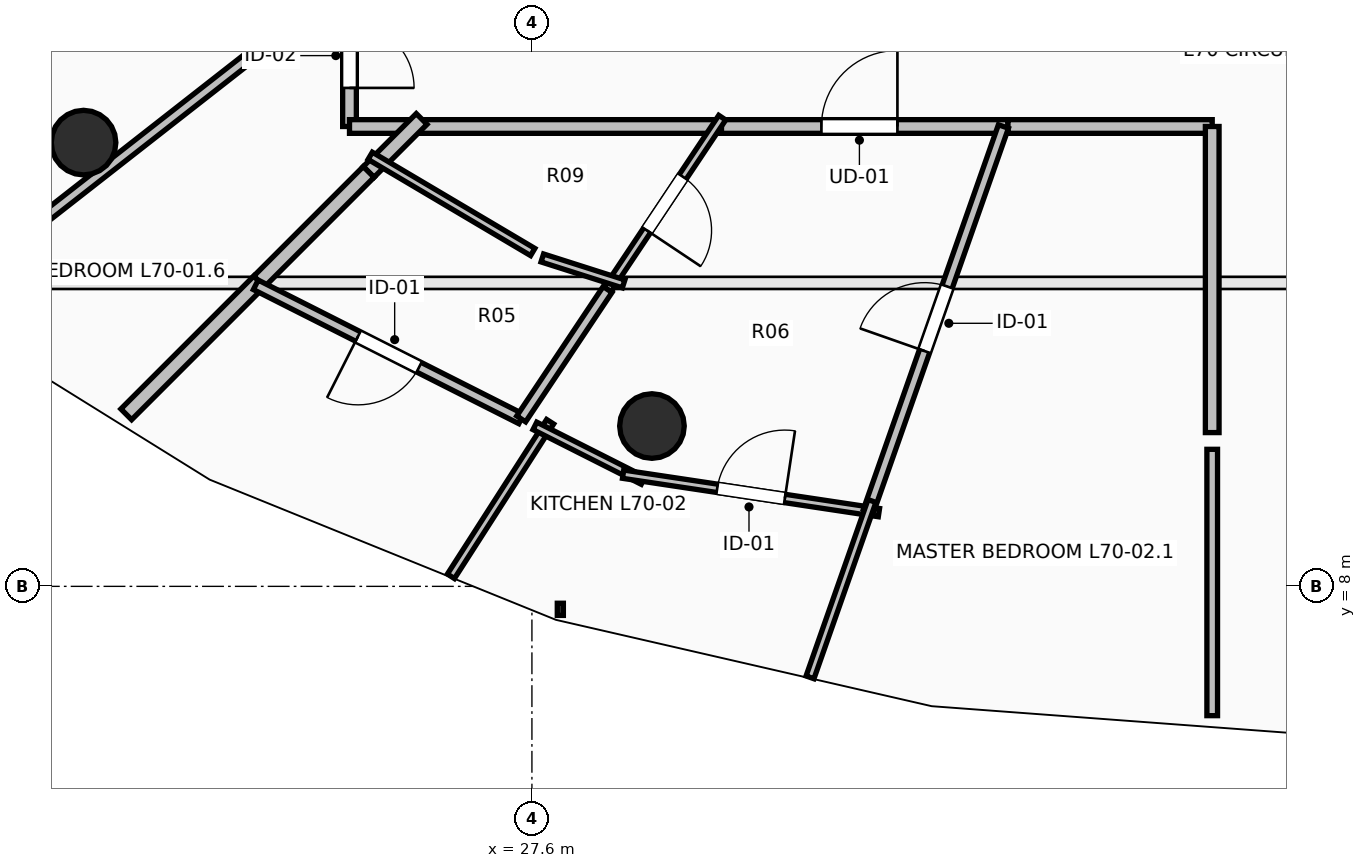
"""IFC4 building model, lengths in metres.
Left out: names, types, materials, properties, quantities, classifications, styles, units other than length and angle.
Written with IfcOpenShell. Run it as: python <this file> out.ifc"""

import sys

from ifc_helpers import new_model, si_unit, direction, frame, frame_2d, origin, origin_2d, place, context, subcontext, project, spatial, rectangle, circle, extrude, element, fill, save


model = new_model("IFC4")
c1 = context("Model", 3, precision=1e-05, world=origin(), true_north=direction((0.0, 1.0)))
c2 = subcontext(c1, "Body", "Model", "MODEL_VIEW")
j1 = project(units=[si_unit("LENGTHUNIT", "METRE"), si_unit("PLANEANGLEUNIT", "RADIAN")], contexts=[c1])
p1 = place(None, origin())
s1 = spatial("IfcSite", under=j1, at=p1, CompositionType="ELEMENT")
p2 = place(p1, origin())
s2 = spatial("IfcBuilding", under=s1, at=p2, CompositionType="ELEMENT")
p3 = place(p2, frame((0.0, 0.0, 259.1)))
s3 = spatial("IfcBuildingStorey", under=s2, at=p3, CompositionType="ELEMENT", Elevation=259.1)
for number, where, z_axis, x_axis in (
    (1, (21.701, 13.838, 0.0), (0.0, 0.0, 1.0), (-0.707, -0.707, 0.0)),
    (2, (29.179, 10.109, 0.0), (0.0, 0.0, 1.0), (-0.383, -0.924, 0.0)),
):
    element("IfcColumn", number, at=place(p3, frame(where, z_axis=z_axis, x_axis=x_axis)), inside=s3, PredefinedType="COLUMN", context=c2, shape_type="SweptSolid", body=[
        extrude(circle(Radius=0.425, at=origin_2d()), origin(), (0.0, 0.0, 1.0), 3.55),
    ])
p4 = place(p3, frame((25.2, 15.915, 0.0), z_axis=(0.0, 0.0, 1.0), x_axis=(0.0, -1.0, 0.0)))
e3 = element("IfcWall", 3, at=p4, inside=s3, PredefinedType="PARTITIONING", context=c2, shape_type="SweptSolid", body=[
    extrude(rectangle(XDim=1.865, YDim=0.18, at=frame_2d((0.933, 0.0))), origin(), (0.0, 0.0, 1.0), 2.482),
])
p5 = place(p4, frame((0.508, 0.0, 0.0)))
e4 = element("IfcOpeningElement", 4, at=p5, cuts=e3, PredefinedType="OPENING", context=c2, shape_type="SweptSolid", body=[
    extrude(rectangle(XDim=0.85, YDim=2.1, at=frame_2d((0.425, 1.05))), frame((0.0, 0.105, 0.0), z_axis=(0.0, -1.0, 0.0), x_axis=(1.0, 0.0, 0.0)), (0.0, 0.0, 1.0), 0.21),
])
p6 = place(p3, frame((25.2, 14.05, 0.0), z_axis=(0.0, 0.0, 1.0), x_axis=(1.0, 0.0, 0.0)))
e5 = element("IfcWall", 5, at=p6, inside=s3, PredefinedType="PARTITIONING", context=c2, shape_type="SweptSolid", body=[
    extrude(rectangle(XDim=0.91, YDim=0.18, at=frame_2d((0.455, 0.0))), origin(), (0.0, 0.0, 1.0), 3.022),
])
p7 = place(p3, frame((29.954, 14.05, 0.0), z_axis=(0.0, 0.0, 1.0), x_axis=(1.0, 0.0, 0.0)))
e6 = element("IfcWall", 6, at=p7, inside=s3, PredefinedType="PARTITIONING", context=c2, shape_type="SweptSolid", body=[
    extrude(rectangle(XDim=3.909, YDim=0.18, at=frame_2d((1.955, 0.0))), origin(), (0.0, 0.0, 1.0), 2.936),
])
p8 = place(p7, frame((1.455, 0.0, 0.0)))
e7 = element("IfcOpeningElement", 7, at=p8, cuts=e6, PredefinedType="OPENING", context=c2, shape_type="SweptSolid", body=[
    extrude(rectangle(XDim=1.0, YDim=2.15, at=frame_2d((0.5, 1.075))), frame((0.0, 0.105, 0.0), z_axis=(0.0, -1.0, 0.0), x_axis=(1.0, 0.0, 0.0)), (0.0, 0.0, 1.0), 0.21),
])
p9 = place(p3, frame((25.97, 14.05, 0.0), z_axis=(0.0, 0.0, 1.0), x_axis=(1.0, 0.0, 0.0)))
e8 = element("IfcWall", 8, at=p9, inside=s3, PredefinedType="PARTITIONING", context=c2, shape_type="SweptSolid", body=[
    extrude(rectangle(XDim=4.124, YDim=0.18, at=frame_2d((2.062, 0.0))), origin(), (0.0, 0.0, 1.0), 2.482),
])
p10 = place(p3, frame((33.863, 14.05, 0.0), z_axis=(0.0, 0.0, 1.0), x_axis=(1.0, 0.0, 0.0)))
e9 = element("IfcWall", 9, at=p10, inside=s3, PredefinedType="PARTITIONING", context=c2, shape_type="SweptSolid", body=[
    extrude(rectangle(XDim=2.687, YDim=0.18, at=frame_2d((1.344, 0.0))), origin(), (0.0, 0.0, 1.0), 2.936),
])
p11 = place(p3, frame((36.55, 14.05, 0.0), z_axis=(0.0, 0.0, 1.0), x_axis=(0.0, -1.0, 0.0)))
e10 = element("IfcWall", 10, at=p11, inside=s3, PredefinedType="PARTITIONING", context=c2, shape_type="SweptSolid", body=[
    extrude(rectangle(XDim=4.027, YDim=0.18, at=frame_2d((2.014, 0.0))), origin(), (0.0, 0.0, 1.0), 2.936),
])
p12 = place(p3, frame((17.602, 13.72, 0.0), z_axis=(0.0, 0.0, 1.0), x_axis=(0.856734134601, 0.515758298633, 0.0)))
e11 = element("IfcWall", 11, at=p12, inside=s3, PredefinedType="PARTITIONING", context=c2, shape_type="SweptSolid", body=[
    extrude(rectangle(XDim=8.868, YDim=0.14, at=frame_2d((4.434, 0.0))), origin(), (0.0, 0.0, 1.0), 2.482),
])
p13 = place(p3, frame((19.819, 11.782, 0.0), z_axis=(0.0, 0.0, 1.0), x_axis=(0.78765580417, 0.61611552014, 0.0)))
e12 = element("IfcWall", 12, at=p13, inside=s3, PredefinedType="PARTITIONING", context=c2, shape_type="SweptSolid", body=[
    extrude(rectangle(XDim=6.832, YDim=0.14, at=frame_2d((3.416, 0.0))), origin(), (0.0, 0.0, 1.0), 2.482),
])
p14 = place(p3, frame((22.263, 10.263, 0.0), z_axis=(0.0, 0.0, 1.0), x_axis=(0.707106781187, 0.707106781187, 0.0)))
e13 = element("IfcWall", 13, at=p14, inside=s3, PredefinedType="PARTITIONING", context=c2, shape_type="SweptSolid", body=[
    extrude(rectangle(XDim=2.473, YDim=0.2, at=frame_2d((1.237, 0.0))), origin(), (0.0, 0.0, 1.0), 3.29),
])
p15 = place(p3, frame((25.452, 13.452, 0.0), z_axis=(0.0, 0.0, 1.0), x_axis=(0.707106781187, 0.707106781187, 0.0)))
e14 = element("IfcWall", 14, at=p15, inside=s3, PredefinedType="PARTITIONING", context=c2, shape_type="SweptSolid", body=[
    extrude(rectangle(XDim=0.986, YDim=0.2, at=frame_2d((0.493, 0.0))), origin(), (0.0, 0.0, 1.0), 3.022),
])
p16 = place(p3, frame((24.012, 12.012, 0.0), z_axis=(0.0, 0.0, 1.0), x_axis=(0.707106781187, 0.707106781187, 0.0)))
e15 = element("IfcWall", 15, at=p16, inside=s3, PredefinedType="PARTITIONING", context=c2, shape_type="SweptSolid", body=[
    extrude(rectangle(XDim=2.036, YDim=0.2, at=frame_2d((1.018, 0.0))), origin(), (0.0, 0.0, 1.0), 2.874),
])
p17 = place(p3, frame((30.104, 14.167, 0.0), z_axis=(0.0, 0.0, 1.0), x_axis=(-0.555011080332, -0.831842954354, 0.0)))
e16 = element("IfcWall", 16, at=p17, inside=s3, PredefinedType="PARTITIONING", context=c2, shape_type="SweptSolid", body=[
    extrude(rectangle(XDim=2.718, YDim=0.11, at=frame_2d((1.359, 0.0))), origin(), (0.0, 0.0, 1.0), 2.482),
])
p18 = place(p17, frame((0.934, 0.0, 0.0)))
e17 = element("IfcOpeningElement", 17, at=p18, cuts=e16, PredefinedType="OPENING", context=c2, shape_type="SweptSolid", body=[
    extrude(rectangle(XDim=0.85, YDim=2.1, at=frame_2d((0.425, 1.05))), frame((0.0, 0.07, 0.0), z_axis=(0.0, -1.0, 0.0), x_axis=(1.0, 0.0, 0.0)), (0.0, 0.0, 1.0), 0.14),
])
p19 = place(p3, frame((26.534, 8.132, 0.0), z_axis=(0.0, 0.0, 1.0), x_axis=(0.540114041626, 0.841591838149, 0.0)))
e18 = element("IfcWall", 18, at=p19, inside=s3, PredefinedType="PARTITIONING", context=c2, shape_type="SweptSolid", body=[
    extrude(rectangle(XDim=2.417, YDim=0.11, at=frame_2d((1.208, 0.0))), origin(), (0.0, 0.0, 1.0), 3.29),
])
p20 = place(p3, frame((27.639, 10.111, 0.0), z_axis=(0.0, 0.0, 1.0), x_axis=(0.892614165752, -0.45082141819, 0.0)))
e19 = element("IfcWall", 19, at=p20, inside=s3, PredefinedType="PARTITIONING", context=c2, shape_type="SweptSolid", body=[
    extrude(rectangle(XDim=1.595, YDim=0.11, at=frame_2d((0.798, 0.0))), origin(), (0.0, 0.0, 1.0), 3.29),
])
p21 = place(p3, frame((28.8, 9.476, 0.0), z_axis=(0.0, 0.0, 1.0), x_axis=(0.988903707347, -0.148557926731, 0.0)))
e20 = element("IfcWall", 20, at=p21, inside=s3, PredefinedType="PARTITIONING", context=c2, shape_type="SweptSolid", body=[
    extrude(rectangle(XDim=3.404, YDim=0.11, at=frame_2d((1.702, 0.0))), origin(), (0.0, 0.0, 1.0), 3.29),
])
p22 = place(p21, frame((1.252, 0.0, 0.0)))
e21 = element("IfcOpeningElement", 21, at=p22, cuts=e20, PredefinedType="OPENING", context=c2, shape_type="SweptSolid", body=[
    extrude(rectangle(XDim=0.9, YDim=2.1, at=frame_2d((0.45, 1.05))), frame((0.0, 0.07, 0.0), z_axis=(0.0, -1.0, 0.0), x_axis=(1.0, 0.0, 0.0)), (0.0, 0.0, 1.0), 0.14),
])
p23 = place(p3, frame((27.459, 10.203, 0.0), z_axis=(0.0, 0.0, 1.0), x_axis=(-0.892559828496, 0.450928988374, 0.0)))
e22 = element("IfcWall", 22, at=p23, inside=s3, PredefinedType="PARTITIONING", context=c2, shape_type="SweptSolid", body=[
    extrude(rectangle(XDim=3.912, YDim=0.14, at=frame_2d((1.956, 0.0))), origin(), (0.0, 0.0, 1.0), 3.29),
])
p24 = place(p23, frame((1.506, 0.0, 0.0)))
e23 = element("IfcOpeningElement", 23, at=p24, cuts=e22, PredefinedType="OPENING", context=c2, shape_type="SweptSolid", body=[
    extrude(rectangle(XDim=0.9, YDim=2.1, at=frame_2d((0.45, 1.05))), frame((0.0, 0.085, 0.0), z_axis=(0.0, -1.0, 0.0), x_axis=(1.0, 0.0, 0.0)), (0.0, 0.0, 1.0), 0.17),
])
p25 = place(p3, frame((28.595, 11.906, 0.0), z_axis=(0.0, 0.0, 1.0), x_axis=(-0.555085472594, -0.831793314541, 0.0)))
e24 = element("IfcWall", 24, at=p25, inside=s3, PredefinedType="PARTITIONING", context=c2, shape_type="SweptSolid", body=[
    extrude(rectangle(XDim=2.047, YDim=0.14, at=frame_2d((1.023, 0.0))), origin(), (0.0, 0.0, 1.0), 2.482),
])
p26 = place(p3, frame((32.027, 8.991, 0.0), z_axis=(0.0, 0.0, 1.0), x_axis=(0.331214316781, 0.943555550224, 0.0)))
e25 = element("IfcWall", 25, at=p26, inside=s3, PredefinedType="PARTITIONING", context=c2, shape_type="SweptSolid", body=[
    extrude(rectangle(XDim=5.362, YDim=0.14, at=frame_2d((2.681, 0.0))), origin(), (0.0, 0.0, 1.0), 2.874),
])
p27 = place(p26, frame((2.231, 0.0, 0.0)))
e26 = element("IfcOpeningElement", 26, at=p27, cuts=e25, PredefinedType="OPENING", context=c2, shape_type="SweptSolid", body=[
    extrude(rectangle(XDim=0.9, YDim=2.1, at=frame_2d((0.45, 1.05))), frame((0.0, 0.085, 0.0), z_axis=(0.0, -1.0, 0.0), x_axis=(1.0, 0.0, 0.0)), (0.0, 0.0, 1.0), 0.17),
])
p28 = place(p3, frame((25.472, 13.664, 0.0), z_axis=(0.0, 0.0, 1.0), x_axis=(0.860546797705, -0.509371386082, 0.0)))
e27 = element("IfcWall", 27, at=p28, inside=s3, PredefinedType="PARTITIONING", context=c2, shape_type="SweptSolid", body=[
    extrude(rectangle(XDim=2.485, YDim=0.11, at=frame_2d((1.242, 0.0))), origin(), (0.0, 0.0, 1.0), 3.022),
])
p29 = place(p3, frame((27.737, 12.321, 0.0), z_axis=(0.0, 0.0, 1.0), x_axis=(0.952754298981, -0.303742071127, 0.0)))
e28 = element("IfcWall", 28, at=p29, inside=s3, PredefinedType="PARTITIONING", context=c2, shape_type="SweptSolid", body=[
    extrude(rectangle(XDim=1.123, YDim=0.11, at=frame_2d((0.562, 0.0))), origin(), (0.0, 0.0, 1.0), 2.482),
])
p30 = place(p3, frame((31.259, 6.803, 0.0), z_axis=(0.0, 0.0, 1.0), x_axis=(0.331407174133, 0.943487829775, 0.0)))
e29 = element("IfcWall", 29, at=p30, inside=s3, PredefinedType="PARTITIONING", context=c2, shape_type="SweptSolid", body=[
    extrude(rectangle(XDim=2.459, YDim=0.11, at=frame_2d((1.229, 0.0))), origin(), (0.0, 0.0, 1.0), 3.29),
])
p31 = place(p3, frame((36.55, 9.803, 0.0), z_axis=(0.0, 0.0, 1.0), x_axis=(0.0, -1.0, 0.0)))
e30 = element("IfcWall", 30, at=p31, inside=s3, PredefinedType="PARTITIONING", context=c2, shape_type="SweptSolid", body=[
    extrude(rectangle(XDim=3.504, YDim=0.14, at=frame_2d((1.752, 0.0))), origin(), (0.0, 0.0, 1.0), 2.874),
])
p32 = place(p8, origin())
e31 = element("IfcDoor", 31, at=p32, inside=s3, OperationType="SINGLE_SWING_RIGHT", PredefinedType="DOOR", context=c2, shape_type="SweptSolid", body=[
    extrude(rectangle(XDim=1.0, YDim=2.15, at=frame_2d((0.5, 1.075))), frame((0.0, 0.025, 0.0), z_axis=(0.0, -1.0, 0.0), x_axis=(1.0, 0.0, 0.0)), (0.0, 0.0, 1.0), 0.05),
])
fill(e7, e31)
p33 = place(p18, origin())
e32 = element("IfcDoor", 32, at=p33, inside=s3, OperationType="SINGLE_SWING_RIGHT", PredefinedType="DOOR", context=c2, shape_type="SweptSolid", body=[
    extrude(rectangle(XDim=0.85, YDim=2.1, at=frame_2d((0.425, 1.05))), frame((0.0, 0.025, 0.0), z_axis=(0.0, -1.0, 0.0), x_axis=(1.0, 0.0, 0.0)), (0.0, 0.0, 1.0), 0.05),
])
fill(e17, e32)
p34 = place(p22, origin())
e33 = element("IfcDoor", 33, at=p34, inside=s3, OperationType="SINGLE_SWING_RIGHT", PredefinedType="DOOR", context=c2, shape_type="SweptSolid", body=[
    extrude(rectangle(XDim=0.9, YDim=2.1, at=frame_2d((0.45, 1.05))), frame((0.0, 0.025, 0.0), z_axis=(0.0, -1.0, 0.0), x_axis=(1.0, 0.0, 0.0)), (0.0, 0.0, 1.0), 0.05),
])
fill(e21, e33)
p35 = place(p24, origin())
e34 = element("IfcDoor", 34, at=p35, inside=s3, OperationType="SINGLE_SWING_RIGHT", PredefinedType="DOOR", context=c2, shape_type="SweptSolid", body=[
    extrude(rectangle(XDim=0.9, YDim=2.1, at=frame_2d((0.45, 1.05))), frame((0.0, 0.025, 0.0), z_axis=(0.0, -1.0, 0.0), x_axis=(1.0, 0.0, 0.0)), (0.0, 0.0, 1.0), 0.05),
])
fill(e23, e34)
p36 = place(p27, origin())
e35 = element("IfcDoor", 35, at=p36, inside=s3, OperationType="SINGLE_SWING_LEFT", PredefinedType="DOOR", context=c2, shape_type="SweptSolid", body=[
    extrude(rectangle(XDim=0.9, YDim=2.1, at=frame_2d((0.45, 1.05))), frame((0.0, 0.025, 0.0), z_axis=(0.0, -1.0, 0.0), x_axis=(1.0, 0.0, 0.0)), (0.0, 0.0, 1.0), 0.05),
])
fill(e26, e35)
p37 = place(p5, origin())
e36 = element("IfcDoor", 36, at=p37, inside=s3, OperationType="SINGLE_SWING_RIGHT", PredefinedType="DOOR", context=c2, shape_type="SweptSolid", body=[
    extrude(rectangle(XDim=0.85, YDim=2.1, at=frame_2d((0.425, 1.05))), frame((0.0, 0.025, 0.0), z_axis=(0.0, -1.0, 0.0), x_axis=(1.0, 0.0, 0.0)), (0.0, 0.0, 1.0), 0.05),
])
fill(e4, e36)
save(model, sys.argv[1])
